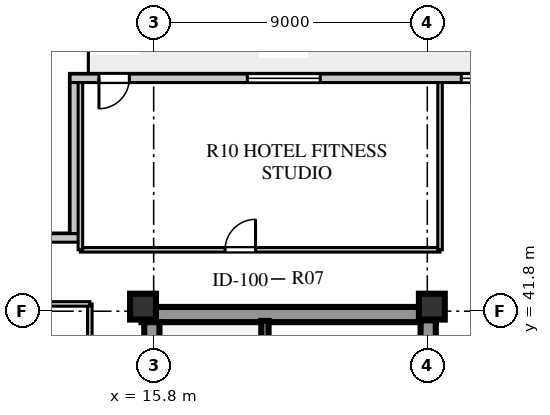
"""IFC4 building model, lengths in metres.
Left out: names, types, materials, properties, quantities, classifications, styles, units other than length and angle.
Written with IfcOpenShell. Run it as: python <this file> out.ifc"""

import sys

from ifc_helpers import new_model, si_unit, direction, frame, frame_2d, origin, origin_2d, place, context, subcontext, project, spatial, rectangle, extrude, element, fill, save


model = new_model("IFC4")
c1 = context("Model", 3, precision=1e-05, world=origin(), true_north=direction((0.0, 1.0)))
c2 = subcontext(c1, "Body", "Model", "MODEL_VIEW")
j1 = project(units=[si_unit("LENGTHUNIT", "METRE"), si_unit("PLANEANGLEUNIT", "RADIAN")], contexts=[c1])
p1 = place(None, origin())
s1 = spatial("IfcSite", under=j1, at=p1, CompositionType="ELEMENT")
p2 = place(p1, origin())
s2 = spatial("IfcBuilding", under=s1, at=p2, CompositionType="ELEMENT")
p3 = place(p2, frame((0.0, 0.0, 196.4)))
s3 = spatial("IfcBuildingStorey", under=s2, at=p3, CompositionType="ELEMENT", Elevation=196.4)
p4 = place(p3, frame((15.4, 41.69, 0.0), z_axis=(0.0, 0.0, 1.0), x_axis=(1.0, 0.0, 0.0)))
e1 = element("IfcWall", 1, at=p4, inside=s3, PredefinedType="SHEAR", context=c2, shape_type="SweptSolid", body=[
    extrude(rectangle(XDim=9.68, YDim=0.5, at=frame_2d((4.84, 0.0))), origin(), (0.0, 0.0, 1.0), 3.6),
])
p5 = place(p3, frame((15.74, 15.81, 0.0), z_axis=(0.0, 0.0, 1.0), x_axis=(0.0, 1.0, 0.0)))
e2 = element("IfcWall", 2, at=p5, inside=s3, PredefinedType="SHEAR", context=c2, shape_type="SweptSolid", body=[
    extrude(rectangle(XDim=25.63, YDim=0.5, at=frame_2d((12.815, 0.0))), origin(), (0.0, 0.0, 1.0), 3.6),
])
p6 = place(p3, frame((24.83, 15.74, 0.0), z_axis=(0.0, 0.0, 1.0), x_axis=(0.0, 1.0, 0.0)))
e3 = element("IfcWall", 3, at=p6, inside=s3, PredefinedType="SHEAR", context=c2, shape_type="SweptSolid", body=[
    extrude(rectangle(XDim=25.76, YDim=0.5, at=frame_2d((12.88, 0.0))), origin(), (0.0, 0.0, 1.0), 3.6),
])
p7 = place(p6, frame((1.61, 0.0, 0.0)))
e4 = element("IfcOpeningElement", 4, at=p7, cuts=e3, PredefinedType="OPENING", context=c2, shape_type="SweptSolid", body=[
    extrude(rectangle(XDim=1.2, YDim=2.1, at=frame_2d((0.6, 1.05))), frame((0.0, 0.26, 0.0), z_axis=(0.0, -1.0, 0.0), x_axis=(1.0, 0.0, 0.0)), (0.0, 0.0, 1.0), 0.52),
])
p8 = place(p6, frame((6.78, 0.0, 0.0)))
e5 = element("IfcOpeningElement", 5, at=p8, cuts=e3, PredefinedType="OPENING", context=c2, shape_type="SweptSolid", body=[
    extrude(rectangle(XDim=0.85, YDim=2.06, at=frame_2d((0.425, 1.03))), frame((0.0, 0.26, 0.0), z_axis=(0.0, -1.0, 0.0), x_axis=(1.0, 0.0, 0.0)), (0.0, 0.0, 1.0), 0.52),
])
p9 = place(p6, frame((12.11, 0.0, 0.0)))
e6 = element("IfcOpeningElement", 6, at=p9, cuts=e3, PredefinedType="OPENING", context=c2, shape_type="SweptSolid", body=[
    extrude(rectangle(XDim=1.5, YDim=2.12, at=frame_2d((0.75, 1.06))), frame((0.0, 0.26, 0.0), z_axis=(0.0, -1.0, 0.0), x_axis=(1.0, 0.0, 0.0)), (0.0, 0.0, 1.0), 0.52),
])
p10 = place(p6, frame((20.11, 0.0, 0.0)))
e7 = element("IfcOpeningElement", 7, at=p10, cuts=e3, PredefinedType="OPENING", context=c2, shape_type="SweptSolid", body=[
    extrude(rectangle(XDim=1.2, YDim=2.12, at=frame_2d((0.6, 1.06))), frame((0.0, 0.26, 0.0), z_axis=(0.0, -1.0, 0.0), x_axis=(1.0, 0.0, 0.0)), (0.0, 0.0, 1.0), 0.52),
])
p11 = place(p6, frame((24.01, 0.0, 0.0)))
e8 = element("IfcOpeningElement", 8, at=p11, cuts=e3, PredefinedType="OPENING", context=c2, shape_type="SweptSolid", body=[
    extrude(rectangle(XDim=0.95, YDim=2.1, at=frame_2d((0.475, 1.05))), frame((0.0, 0.26, 0.0), z_axis=(0.0, -1.0, 0.0), x_axis=(1.0, 0.0, 0.0)), (0.0, 0.0, 1.0), 0.52),
])
for number, where, z_axis, x_axis in (
    (9, (15.45, 41.95, 0.0), (0.0, 0.0, 1.0), (1.0, 0.0, 0.0)),
    (10, (24.95, 41.95, 0.0), (0.0, 0.0, 1.0), (1.0, 0.0, 0.0)),
):
    element("IfcColumn", number, at=place(p3, frame(where, z_axis=z_axis, x_axis=x_axis)), inside=s3, PredefinedType="COLUMN", context=c2, shape_type="SweptSolid", body=[
        extrude(rectangle(XDim=0.85, YDim=0.85, at=origin_2d()), origin(), (0.0, 0.0, 1.0), 3.6),
    ])
p12 = place(p3, frame((45.55, 49.46, 0.0), z_axis=(0.0, 0.0, 1.0), x_axis=(-1.0, 0.0, 0.0)))
e11 = element("IfcWall", 11, at=p12, inside=s3, PredefinedType="STANDARD", context=c2, shape_type="SweptSolid", body=[
    extrude(rectangle(XDim=32.5, YDim=0.28, at=frame_2d((16.25, 0.0))), origin(), (0.0, 0.0, 1.0), 3.6),
])
p13 = place(p12, frame((30.55, 0.0, 0.0)))
e12 = element("IfcOpeningElement", 12, at=p13, cuts=e11, PredefinedType="OPENING", context=c2, shape_type="SweptSolid", body=[
    extrude(rectangle(XDim=1.0, YDim=2.05, at=frame_2d((0.5, 1.025))), frame((0.0, 0.15, 0.0), z_axis=(0.0, -1.0, 0.0), x_axis=(1.0, 0.0, 0.0)), (0.0, 0.0, 1.0), 0.3),
])
p14 = place(p12, frame((24.27, 0.0, 0.8)))
e13 = element("IfcOpeningElement", 13, at=p14, cuts=e11, PredefinedType="OPENING", context=c2, shape_type="SweptSolid", body=[
    extrude(rectangle(XDim=2.4, YDim=2.05, at=frame_2d((1.2, 1.025))), frame((0.0, 0.15, 0.0), z_axis=(0.0, -1.0, 0.0), x_axis=(1.0, 0.0, 0.0)), (0.0, 0.0, 1.0), 0.3),
])
p15 = place(p12, frame((18.43, 0.0, 0.8)))
e14 = element("IfcOpeningElement", 14, at=p15, cuts=e11, PredefinedType="OPENING", context=c2, shape_type="SweptSolid", body=[
    extrude(rectangle(XDim=1.2, YDim=1.75, at=frame_2d((0.6, 0.875))), frame((0.0, 0.15, 0.0), z_axis=(0.0, -1.0, 0.0), x_axis=(1.0, 0.0, 0.0)), (0.0, 0.0, 1.0), 0.3),
])
p16 = place(p12, frame((16.065, 0.0, 0.8)))
e15 = element("IfcOpeningElement", 15, at=p16, cuts=e11, PredefinedType="OPENING", context=c2, shape_type="SweptSolid", body=[
    extrude(rectangle(XDim=1.2, YDim=1.75, at=frame_2d((0.6, 0.875))), frame((0.0, 0.15, 0.0), z_axis=(0.0, -1.0, 0.0), x_axis=(1.0, 0.0, 0.0)), (0.0, 0.0, 1.0), 0.3),
])
p17 = place(p12, frame((13.455, 0.0, 0.8)))
e16 = element("IfcOpeningElement", 16, at=p17, cuts=e11, PredefinedType="OPENING", context=c2, shape_type="SweptSolid", body=[
    extrude(rectangle(XDim=1.65, YDim=1.95, at=frame_2d((0.825, 0.975))), frame((0.0, 0.15, 0.0), z_axis=(0.0, -1.0, 0.0), x_axis=(1.0, 0.0, 0.0)), (0.0, 0.0, 1.0), 0.3),
])
p18 = place(p12, frame((11.295, 0.0, 0.8)))
e17 = element("IfcOpeningElement", 17, at=p18, cuts=e11, PredefinedType="OPENING", context=c2, shape_type="SweptSolid", body=[
    extrude(rectangle(XDim=1.2, YDim=1.75, at=frame_2d((0.6, 0.875))), frame((0.0, 0.15, 0.0), z_axis=(0.0, -1.0, 0.0), x_axis=(1.0, 0.0, 0.0)), (0.0, 0.0, 1.0), 0.3),
])
p19 = place(p12, frame((6.655, 0.0, 0.8)))
e18 = element("IfcOpeningElement", 18, at=p19, cuts=e11, PredefinedType="OPENING", context=c2, shape_type="SweptSolid", body=[
    extrude(rectangle(XDim=2.25, YDim=2.0, at=frame_2d((1.125, 1.0))), frame((0.0, 0.15, 0.0), z_axis=(0.0, -1.0, 0.0), x_axis=(1.0, 0.0, 0.0)), (0.0, 0.0, 1.0), 0.3),
])
p20 = place(p12, frame((1.52, 0.0, 0.8)))
e19 = element("IfcOpeningElement", 19, at=p20, cuts=e11, PredefinedType="OPENING", context=c2, shape_type="SweptSolid", body=[
    extrude(rectangle(XDim=1.8, YDim=2.0, at=frame_2d((0.9, 1.0))), frame((0.0, 0.15, 0.0), z_axis=(0.0, -1.0, 0.0), x_axis=(1.0, 0.0, 0.0)), (0.0, 0.0, 1.0), 0.3),
])
p21 = place(p3, frame((13.19, 49.32, 0.0), z_axis=(0.0, 0.0, 1.0), x_axis=(0.0, -1.0, 0.0)))
e20 = element("IfcWall", 20, at=p21, inside=s3, PredefinedType="STANDARD", context=c2, shape_type="SweptSolid", body=[
    extrude(rectangle(XDim=4.97, YDim=0.28, at=frame_2d((2.485, 0.0))), origin(), (0.0, 0.0, 1.0), 3.6),
])
p22 = place(p3, frame((13.33, 44.21, 0.0), z_axis=(0.0, 0.0, 1.0), x_axis=(-1.0, 0.0, 0.0)))
e21 = element("IfcWall", 21, at=p22, inside=s3, PredefinedType="STANDARD", context=c2, shape_type="SweptSolid", body=[
    extrude(rectangle(XDim=5.53, YDim=0.28, at=frame_2d((2.765, 0.0))), origin(), (0.0, 0.0, 1.0), 3.6),
])
p23 = place(p3, frame((19.46, 33.3, 0.0), z_axis=(0.0, 0.0, 1.0), x_axis=(0.0, 1.0, 0.0)))
e22 = element("IfcWall", 22, at=p23, inside=s3, PredefinedType="SHEAR", context=c2, shape_type="SweptSolid", body=[
    extrude(rectangle(XDim=8.18, YDim=0.24, at=frame_2d((4.09, 0.0))), origin(), (0.0, 0.0, 1.0), 3.85),
])
p24 = place(p23, frame((0.65, 0.0, 0.0)))
e23 = element("IfcOpeningElement", 23, at=p24, cuts=e22, PredefinedType="OPENING", context=c2, shape_type="SweptSolid", body=[
    extrude(rectangle(XDim=1.1, YDim=2.1, at=frame_2d((0.55, 1.05))), frame((0.0, 0.13, 0.0), z_axis=(0.0, -1.0, 0.0), x_axis=(1.0, 0.0, 0.0)), (0.0, 0.0, 1.0), 0.26),
])
p25 = place(p3, frame((13.7, 15.16, 0.0), z_axis=(0.0, 0.0, 1.0), x_axis=(0.0, 1.0, 0.0)))
e24 = element("IfcWall", 24, at=p25, inside=s3, PredefinedType="PARTITIONING", context=c2, shape_type="SweptSolid", body=[
    extrude(rectangle(XDim=26.88, YDim=0.15, at=frame_2d((13.44, 0.0))), origin(), (0.0, 0.0, 1.0), 3.6),
])
p26 = place(p25, frame((0.91, 0.0, 0.0)))
e25 = element("IfcOpeningElement", 25, at=p26, cuts=e24, PredefinedType="OPENING", context=c2, shape_type="SweptSolid", body=[
    extrude(rectangle(XDim=0.95, YDim=2.1, at=frame_2d((0.475, 1.05))), frame((0.0, 0.085, 0.0), z_axis=(0.0, -1.0, 0.0), x_axis=(1.0, 0.0, 0.0)), (0.0, 0.0, 1.0), 0.17),
])
p27 = place(p25, frame((13.99, 0.0, 0.0)))
e26 = element("IfcOpeningElement", 26, at=p27, cuts=e24, PredefinedType="OPENING", context=c2, shape_type="SweptSolid", body=[
    extrude(rectangle(XDim=0.95, YDim=2.1, at=frame_2d((0.475, 1.05))), frame((0.0, 0.085, 0.0), z_axis=(0.0, -1.0, 0.0), x_axis=(1.0, 0.0, 0.0)), (0.0, 0.0, 1.0), 0.17),
])
p28 = place(p3, frame((8.08, 42.04, 0.0), z_axis=(0.0, 0.0, 1.0), x_axis=(1.0, 0.0, 0.0)))
e27 = element("IfcWall", 27, at=p28, inside=s3, PredefinedType="PARTITIONING", context=c2, shape_type="SweptSolid", body=[
    extrude(rectangle(XDim=5.62, YDim=0.15, at=frame_2d((2.81, 0.0))), origin(), (0.0, 0.0, 1.0), 3.15),
])
p29 = place(p3, frame((13.39, 43.82, 0.0), z_axis=(0.0, 0.0, 1.0), x_axis=(1.0, 0.0, 0.0)))
e28 = element("IfcWall", 28, at=p29, inside=s3, PredefinedType="PARTITIONING", context=c2, shape_type="SweptSolid", body=[
    extrude(rectangle(XDim=11.83, YDim=0.15, at=frame_2d((5.915, 0.0))), origin(), (0.0, 0.0, 1.0), 3.6),
])
p30 = place(p29, frame((4.76, 0.0, 0.0)))
e29 = element("IfcOpeningElement", 29, at=p30, cuts=e28, PredefinedType="OPENING", context=c2, shape_type="SweptSolid", body=[
    extrude(rectangle(XDim=1.0, YDim=2.08, at=frame_2d((0.5, 1.04))), frame((0.0, 0.085, 0.0), z_axis=(0.0, -1.0, 0.0), x_axis=(1.0, 0.0, 0.0)), (0.0, 0.0, 1.0), 0.17),
])
p31 = place(p3, frame((13.39, 43.82, 0.0), z_axis=(0.0, 0.0, 1.0), x_axis=(0.0, 1.0, 0.0)))
e30 = element("IfcWall", 30, at=p31, inside=s3, PredefinedType="PARTITIONING", context=c2, shape_type="SweptSolid", body=[
    extrude(rectangle(XDim=5.5, YDim=0.15, at=frame_2d((2.75, 0.0))), origin(), (0.0, 0.0, 1.0), 3.6),
])
p32 = place(p3, frame((25.22, 43.82, 0.0), z_axis=(0.0, 0.0, 1.0), x_axis=(0.0, 1.0, 0.0)))
e31 = element("IfcWall", 31, at=p32, inside=s3, PredefinedType="PARTITIONING", context=c2, shape_type="SweptSolid", body=[
    extrude(rectangle(XDim=5.5, YDim=0.15, at=frame_2d((2.75, 0.0))), origin(), (0.0, 0.0, 1.0), 3.15),
])
p33 = place(p13, frame((1.0, 0.0, 0.0), z_axis=(0.0, 0.0, 1.0), x_axis=(-1.0, 0.0, 0.0)))
e32 = element("IfcDoor", 32, at=p33, inside=s3, OperationType="SINGLE_SWING_LEFT", PredefinedType="DOOR", context=c2, shape_type="SweptSolid", body=[
    extrude(rectangle(XDim=1.0, YDim=2.05, at=frame_2d((0.5, 1.025))), frame((0.0, 0.025, 0.0), z_axis=(0.0, -1.0, 0.0), x_axis=(1.0, 0.0, 0.0)), (0.0, 0.0, 1.0), 0.05),
])
fill(e12, e32)
p34 = place(p14, origin())
e33 = element("IfcWindow", 33, at=p34, inside=s3, PartitioningType="SINGLE_PANEL", PredefinedType="WINDOW", context=c2, shape_type="SweptSolid", body=[
    extrude(rectangle(XDim=2.4, YDim=2.05, at=frame_2d((1.2, 1.025))), frame((0.0, 0.03, 0.0), z_axis=(0.0, -1.0, 0.0), x_axis=(1.0, 0.0, 0.0)), (0.0, 0.0, 1.0), 0.06),
])
fill(e13, e33)
p35 = place(p15, origin())
e34 = element("IfcWindow", 34, at=p35, inside=s3, PartitioningType="SINGLE_PANEL", PredefinedType="WINDOW", context=c2, shape_type="SweptSolid", body=[
    extrude(rectangle(XDim=1.2, YDim=1.75, at=frame_2d((0.6, 0.875))), frame((0.0, 0.03, 0.0), z_axis=(0.0, -1.0, 0.0), x_axis=(1.0, 0.0, 0.0)), (0.0, 0.0, 1.0), 0.06),
])
fill(e14, e34)
p36 = place(p30, origin())
e35 = element("IfcDoor", 35, at=p36, inside=s3, OperationType="SINGLE_SWING_RIGHT", PredefinedType="DOOR", context=c2, shape_type="SweptSolid", body=[
    extrude(rectangle(XDim=1.0, YDim=2.08, at=frame_2d((0.5, 1.04))), frame((0.0, 0.025, 0.0), z_axis=(0.0, -1.0, 0.0), x_axis=(1.0, 0.0, 0.0)), (0.0, 0.0, 1.0), 0.05),
])
fill(e29, e35)
save(model, sys.argv[1])
